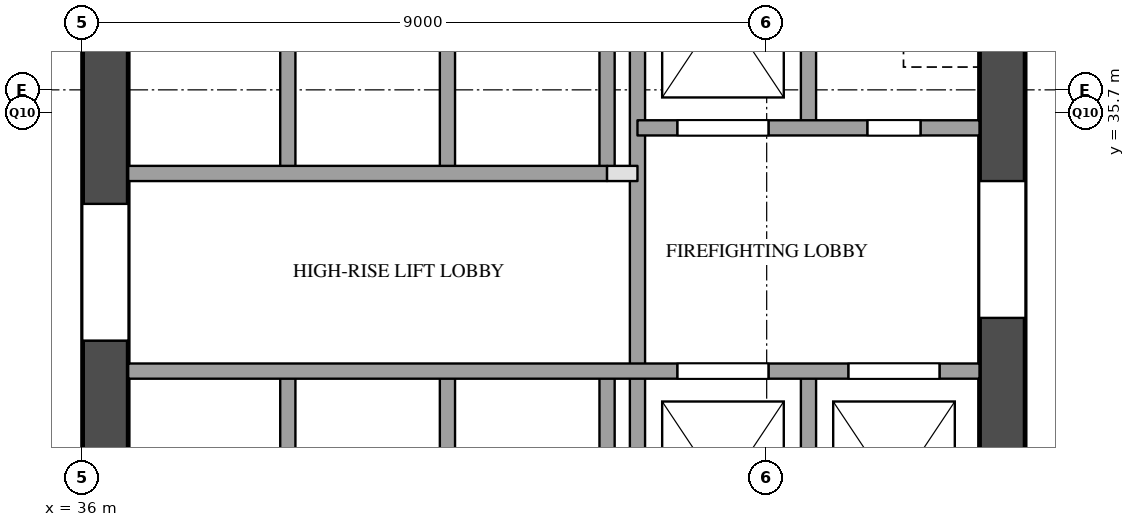
"""IFC4 building model, lengths in metres.
Left out: names, types, materials, properties, quantities, classifications, styles, units other than length and angle.
Written with IfcOpenShell. Run it as: python <this file> out.ifc"""

import sys

from ifc_helpers import new_model, si_unit, direction, frame, frame_2d, origin, place, context, subcontext, project, spatial, rectangle, extrude, element, fill, save


model = new_model("IFC4")
c1 = context("Model", 3, precision=1e-05, world=origin(), true_north=direction((0.0, 1.0)))
c2 = subcontext(c1, "Body", "Model", "MODEL_VIEW")
j1 = project(units=[si_unit("LENGTHUNIT", "METRE"), si_unit("PLANEANGLEUNIT", "RADIAN")], contexts=[c1])
p1 = place(None, origin())
s1 = spatial("IfcSite", under=j1, at=p1, CompositionType="ELEMENT")
p2 = place(p1, origin())
s2 = spatial("IfcBuilding", under=s1, at=p2, CompositionType="ELEMENT")
p3 = place(p2, frame((0.0, 0.0, 100.6)))
s3 = spatial("IfcBuildingStorey", under=s2, at=p3, CompositionType="ELEMENT", Elevation=100.6)
p4 = place(p3, frame((36.3, 29.1, 0.0), z_axis=(0.0, 0.0, 1.0), x_axis=(0.0, 1.0, 0.0)))
e1 = element("IfcWall", 1, at=p4, inside=s3, PredefinedType="SHEAR", context=c2, shape_type="SweptSolid", body=[
    extrude(rectangle(XDim=20.3, YDim=0.6, at=frame_2d((10.15, 0.0))), origin(), (0.0, 0.0, 1.0), 3.5),
])
p5 = place(p4, frame((3.6, 0.0, 0.0)))
e2 = element("IfcOpeningElement", 2, at=p5, cuts=e1, PredefinedType="OPENING", context=c2, shape_type="SweptSolid", body=[
    extrude(rectangle(XDim=1.8, YDim=2.1, at=frame_2d((0.9, 1.05))), frame((0.0, 0.31, 0.0), z_axis=(0.0, -1.0, 0.0), x_axis=(1.0, 0.0, 0.0)), (0.0, 0.0, 1.0), 0.62),
])
p6 = place(p4, frame((16.4, 0.0, 0.0)))
e3 = element("IfcOpeningElement", 3, at=p6, cuts=e1, PredefinedType="OPENING", context=c2, shape_type="SweptSolid", body=[
    extrude(rectangle(XDim=1.0, YDim=2.1, at=frame_2d((0.5, 1.05))), frame((0.0, 0.31, 0.0), z_axis=(0.0, -1.0, 0.0), x_axis=(1.0, 0.0, 0.0)), (0.0, 0.0, 1.0), 0.62),
])
p7 = place(p3, frame((48.1, 29.1, 0.0), z_axis=(0.0, 0.0, 1.0), x_axis=(0.0, 1.0, 0.0)))
e4 = element("IfcWall", 4, at=p7, inside=s3, PredefinedType="SHEAR", context=c2, shape_type="SweptSolid", body=[
    extrude(rectangle(XDim=20.3, YDim=0.6, at=frame_2d((10.15, 0.0))), origin(), (0.0, 0.0, 1.0), 3.5),
])
p8 = place(p7, frame((12.5, 0.0, 0.0)))
e5 = element("IfcOpeningElement", 5, at=p8, cuts=e4, PredefinedType="OPENING", context=c2, shape_type="SweptSolid", body=[
    extrude(rectangle(XDim=0.7, YDim=2.1, at=frame_2d((0.35, 1.05))), frame((0.0, 0.31, 0.0), z_axis=(0.0, -1.0, 0.0), x_axis=(1.0, 0.0, 0.0)), (0.0, 0.0, 1.0), 0.62),
])
p9 = place(p7, frame((3.9, 0.0, 0.0)))
e6 = element("IfcOpeningElement", 6, at=p9, cuts=e4, PredefinedType="OPENING", context=c2, shape_type="SweptSolid", body=[
    extrude(rectangle(XDim=1.8, YDim=2.1, at=frame_2d((0.9, 1.05))), frame((0.0, 0.31, 0.0), z_axis=(0.0, -1.0, 0.0), x_axis=(1.0, 0.0, 0.0)), (0.0, 0.0, 1.0), 0.62),
])
p10 = place(p3, frame((38.7, 29.1, 0.0), z_axis=(0.0, 0.0, 1.0), x_axis=(0.0, 1.0, 0.0)))
e7 = element("IfcWall", 7, at=p10, inside=s3, PredefinedType="SOLIDWALL", context=c2, shape_type="SweptSolid", body=[
    extrude(rectangle(XDim=3.2, YDim=0.2, at=frame_2d((1.6, 0.0))), origin(), (0.0, 0.0, 1.0), 3.5),
])
p11 = place(p3, frame((38.7, 34.9, 0.0), z_axis=(0.0, 0.0, 1.0), x_axis=(0.0, 1.0, 0.0)))
e8 = element("IfcWall", 8, at=p11, inside=s3, PredefinedType="SOLIDWALL", context=c2, shape_type="SweptSolid", body=[
    extrude(rectangle(XDim=3.2, YDim=0.2, at=frame_2d((1.6, 0.0))), origin(), (0.0, 0.0, 1.0), 3.5),
])
p12 = place(p3, frame((40.8, 29.1, 0.0), z_axis=(0.0, 0.0, 1.0), x_axis=(0.0, 1.0, 0.0)))
e9 = element("IfcWall", 9, at=p12, inside=s3, PredefinedType="SOLIDWALL", context=c2, shape_type="SweptSolid", body=[
    extrude(rectangle(XDim=3.2, YDim=0.2, at=frame_2d((1.6, 0.0))), origin(), (0.0, 0.0, 1.0), 3.5),
])
p13 = place(p3, frame((40.8, 34.9, 0.0), z_axis=(0.0, 0.0, 1.0), x_axis=(0.0, 1.0, 0.0)))
e10 = element("IfcWall", 10, at=p13, inside=s3, PredefinedType="SOLIDWALL", context=c2, shape_type="SweptSolid", body=[
    extrude(rectangle(XDim=3.2, YDim=0.2, at=frame_2d((1.6, 0.0))), origin(), (0.0, 0.0, 1.0), 3.5),
])
p14 = place(p3, frame((42.9, 29.1, 0.0), z_axis=(0.0, 0.0, 1.0), x_axis=(0.0, 1.0, 0.0)))
e11 = element("IfcWall", 11, at=p14, inside=s3, PredefinedType="SOLIDWALL", context=c2, shape_type="SweptSolid", body=[
    extrude(rectangle(XDim=3.2, YDim=0.2, at=frame_2d((1.6, 0.0))), origin(), (0.0, 0.0, 1.0), 3.5),
])
p15 = place(p3, frame((42.9, 34.9, 0.0), z_axis=(0.0, 0.0, 1.0), x_axis=(0.0, 1.0, 0.0)))
e12 = element("IfcWall", 12, at=p15, inside=s3, PredefinedType="SOLIDWALL", context=c2, shape_type="SweptSolid", body=[
    extrude(rectangle(XDim=3.2, YDim=0.2, at=frame_2d((1.6, 0.0))), origin(), (0.0, 0.0, 1.0), 3.5),
])
p16 = place(p3, frame((43.3, 29.1, 0.0), z_axis=(0.0, 0.0, 1.0), x_axis=(0.0, 1.0, 0.0)))
e13 = element("IfcWall", 13, at=p16, inside=s3, PredefinedType="SOLIDWALL", context=c2, shape_type="SweptSolid", body=[
    extrude(rectangle(XDim=9.9, YDim=0.2, at=frame_2d((4.95, 0.0))), origin(), (0.0, 0.0, 1.0), 3.5),
])
for number, where, z_axis, x_axis in (
    (14, (45.55, 29.1, 0.0), (0.0, 0.0, 1.0), (0.0, 1.0, 0.0)),
    (15, (45.55, 35.5, 0.0), (0.0, 0.0, 1.0), (0.0, 1.0, 0.0)),
):
    element("IfcWall", number, at=place(p3, frame(where, z_axis=z_axis, x_axis=x_axis)), inside=s3, PredefinedType="SOLIDWALL", context=c2, shape_type="SweptSolid", body=[
        extrude(rectangle(XDim=3.2, YDim=0.2, at=frame_2d((1.6, 0.0))), origin(), (0.0, 0.0, 1.0), 3.5),
    ])
p17 = place(p3, frame((36.6, 32.3, 0.0), z_axis=(0.0, 0.0, 1.0), x_axis=(1.0, 0.0, 0.0)))
e16 = element("IfcWall", 16, at=p17, inside=s3, PredefinedType="SOLIDWALL", context=c2, shape_type="SweptSolid", body=[
    extrude(rectangle(XDim=11.2, YDim=0.2, at=frame_2d((5.6, 0.0))), origin(), (0.0, 0.0, 1.0), 3.5),
])
p18 = place(p17, frame((7.225, 0.0, 0.0)))
e17 = element("IfcOpeningElement", 17, at=p18, cuts=e16, PredefinedType="OPENING", context=c2, shape_type="SweptSolid", body=[
    extrude(rectangle(XDim=1.2, YDim=2.1, at=frame_2d((0.6, 1.05))), frame((0.0, 0.11, 0.0), z_axis=(0.0, -1.0, 0.0), x_axis=(1.0, 0.0, 0.0)), (0.0, 0.0, 1.0), 0.22),
])
p19 = place(p17, frame((9.475, 0.0, 0.0)))
e18 = element("IfcOpeningElement", 18, at=p19, cuts=e16, PredefinedType="OPENING", context=c2, shape_type="SweptSolid", body=[
    extrude(rectangle(XDim=1.2, YDim=2.1, at=frame_2d((0.6, 1.05))), frame((0.0, 0.11, 0.0), z_axis=(0.0, -1.0, 0.0), x_axis=(1.0, 0.0, 0.0)), (0.0, 0.0, 1.0), 0.22),
])
p20 = place(p3, frame((42.9, 34.9, 0.0), z_axis=(0.0, 0.0, 1.0), x_axis=(1.0, 0.0, 0.0)))
e19 = element("IfcWall", 19, at=p20, inside=s3, PredefinedType="PARTITIONING", context=c2, shape_type="SweptSolid", body=[
    extrude(rectangle(XDim=0.4, YDim=0.2, at=frame_2d((0.2, 0.0))), origin(), (0.0, 0.0, 1.0), 3.5),
])
p21 = place(p3, frame((36.6, 34.9, 0.0), z_axis=(0.0, 0.0, 1.0), x_axis=(1.0, 0.0, 0.0)))
e20 = element("IfcWall", 20, at=p21, inside=s3, PredefinedType="SOLIDWALL", context=c2, shape_type="SweptSolid", body=[
    extrude(rectangle(XDim=6.3, YDim=0.2, at=frame_2d((3.15, 0.0))), origin(), (0.0, 0.0, 1.0), 3.5),
])
p22 = place(p3, frame((43.3, 35.5, 0.0), z_axis=(0.0, 0.0, 1.0), x_axis=(1.0, 0.0, 0.0)))
e21 = element("IfcWall", 21, at=p22, inside=s3, PredefinedType="SOLIDWALL", context=c2, shape_type="SweptSolid", body=[
    extrude(rectangle(XDim=4.5, YDim=0.2, at=frame_2d((2.25, 0.0))), origin(), (0.0, 0.0, 1.0), 3.5),
])
p23 = place(p22, frame((0.525, 0.0, 0.0)))
e22 = element("IfcOpeningElement", 22, at=p23, cuts=e21, PredefinedType="OPENING", context=c2, shape_type="SweptSolid", body=[
    extrude(rectangle(XDim=1.2, YDim=2.1, at=frame_2d((0.6, 1.05))), frame((0.0, 0.11, 0.0), z_axis=(0.0, -1.0, 0.0), x_axis=(1.0, 0.0, 0.0)), (0.0, 0.0, 1.0), 0.22),
])
p24 = place(p22, frame((3.025, 0.0, 0.0)))
e23 = element("IfcOpeningElement", 23, at=p24, cuts=e21, PredefinedType="OPENING", context=c2, shape_type="SweptSolid", body=[
    extrude(rectangle(XDim=0.7, YDim=2.1, at=frame_2d((0.35, 1.05))), frame((0.0, 0.11, 0.0), z_axis=(0.0, -1.0, 0.0), x_axis=(1.0, 0.0, 0.0)), (0.0, 0.0, 1.0), 0.22),
])
p25 = place(p18, origin())
e24 = element("IfcDoor", 24, at=p25, inside=s3, OperationType="SLIDING_TO_LEFT", PredefinedType="DOOR", context=c2, shape_type="SweptSolid", body=[
    extrude(rectangle(XDim=1.2, YDim=2.1, at=frame_2d((0.6, 1.05))), frame((0.0, 0.025, 0.0), z_axis=(0.0, -1.0, 0.0), x_axis=(1.0, 0.0, 0.0)), (0.0, 0.0, 1.0), 0.05),
])
fill(e17, e24)
p26 = place(p19, origin())
e25 = element("IfcDoor", 25, at=p26, inside=s3, OperationType="SLIDING_TO_LEFT", PredefinedType="DOOR", context=c2, shape_type="SweptSolid", body=[
    extrude(rectangle(XDim=1.2, YDim=2.1, at=frame_2d((0.6, 1.05))), frame((0.0, 0.025, 0.0), z_axis=(0.0, -1.0, 0.0), x_axis=(1.0, 0.0, 0.0)), (0.0, 0.0, 1.0), 0.05),
])
fill(e18, e25)
p27 = place(p23, origin())
e26 = element("IfcDoor", 26, at=p27, inside=s3, OperationType="SLIDING_TO_LEFT", PredefinedType="DOOR", context=c2, shape_type="SweptSolid", body=[
    extrude(rectangle(XDim=1.2, YDim=2.1, at=frame_2d((0.6, 1.05))), frame((0.0, 0.025, 0.0), z_axis=(0.0, -1.0, 0.0), x_axis=(1.0, 0.0, 0.0)), (0.0, 0.0, 1.0), 0.05),
])
fill(e22, e26)
p28 = place(p5, origin())
e27 = element("IfcDoor", 27, at=p28, inside=s3, OperationType="DOUBLE_DOOR_SINGLE_SWING", PredefinedType="DOOR", context=c2, shape_type="SweptSolid", body=[
    extrude(rectangle(XDim=1.8, YDim=2.1, at=frame_2d((0.9, 1.05))), frame((0.0, 0.025, 0.0), z_axis=(0.0, -1.0, 0.0), x_axis=(1.0, 0.0, 0.0)), (0.0, 0.0, 1.0), 0.05),
])
fill(e2, e27)
p29 = place(p9, origin())
e28 = element("IfcDoor", 28, at=p29, inside=s3, OperationType="DOUBLE_DOOR_SINGLE_SWING", PredefinedType="DOOR", context=c2, shape_type="SweptSolid", body=[
    extrude(rectangle(XDim=1.8, YDim=2.1, at=frame_2d((0.9, 1.05))), frame((0.0, 0.025, 0.0), z_axis=(0.0, -1.0, 0.0), x_axis=(1.0, 0.0, 0.0)), (0.0, 0.0, 1.0), 0.05),
])
fill(e6, e28)
p30 = place(p24, origin())
e29 = element("IfcDoor", 29, at=p30, inside=s3, OperationType="SINGLE_SWING_RIGHT", PredefinedType="DOOR", context=c2, shape_type="SweptSolid", body=[
    extrude(rectangle(XDim=0.7, YDim=2.1, at=frame_2d((0.35, 1.05))), frame((0.0, 0.025, 0.0), z_axis=(0.0, -1.0, 0.0), x_axis=(1.0, 0.0, 0.0)), (0.0, 0.0, 1.0), 0.05),
])
fill(e23, e29)
save(model, sys.argv[1])
